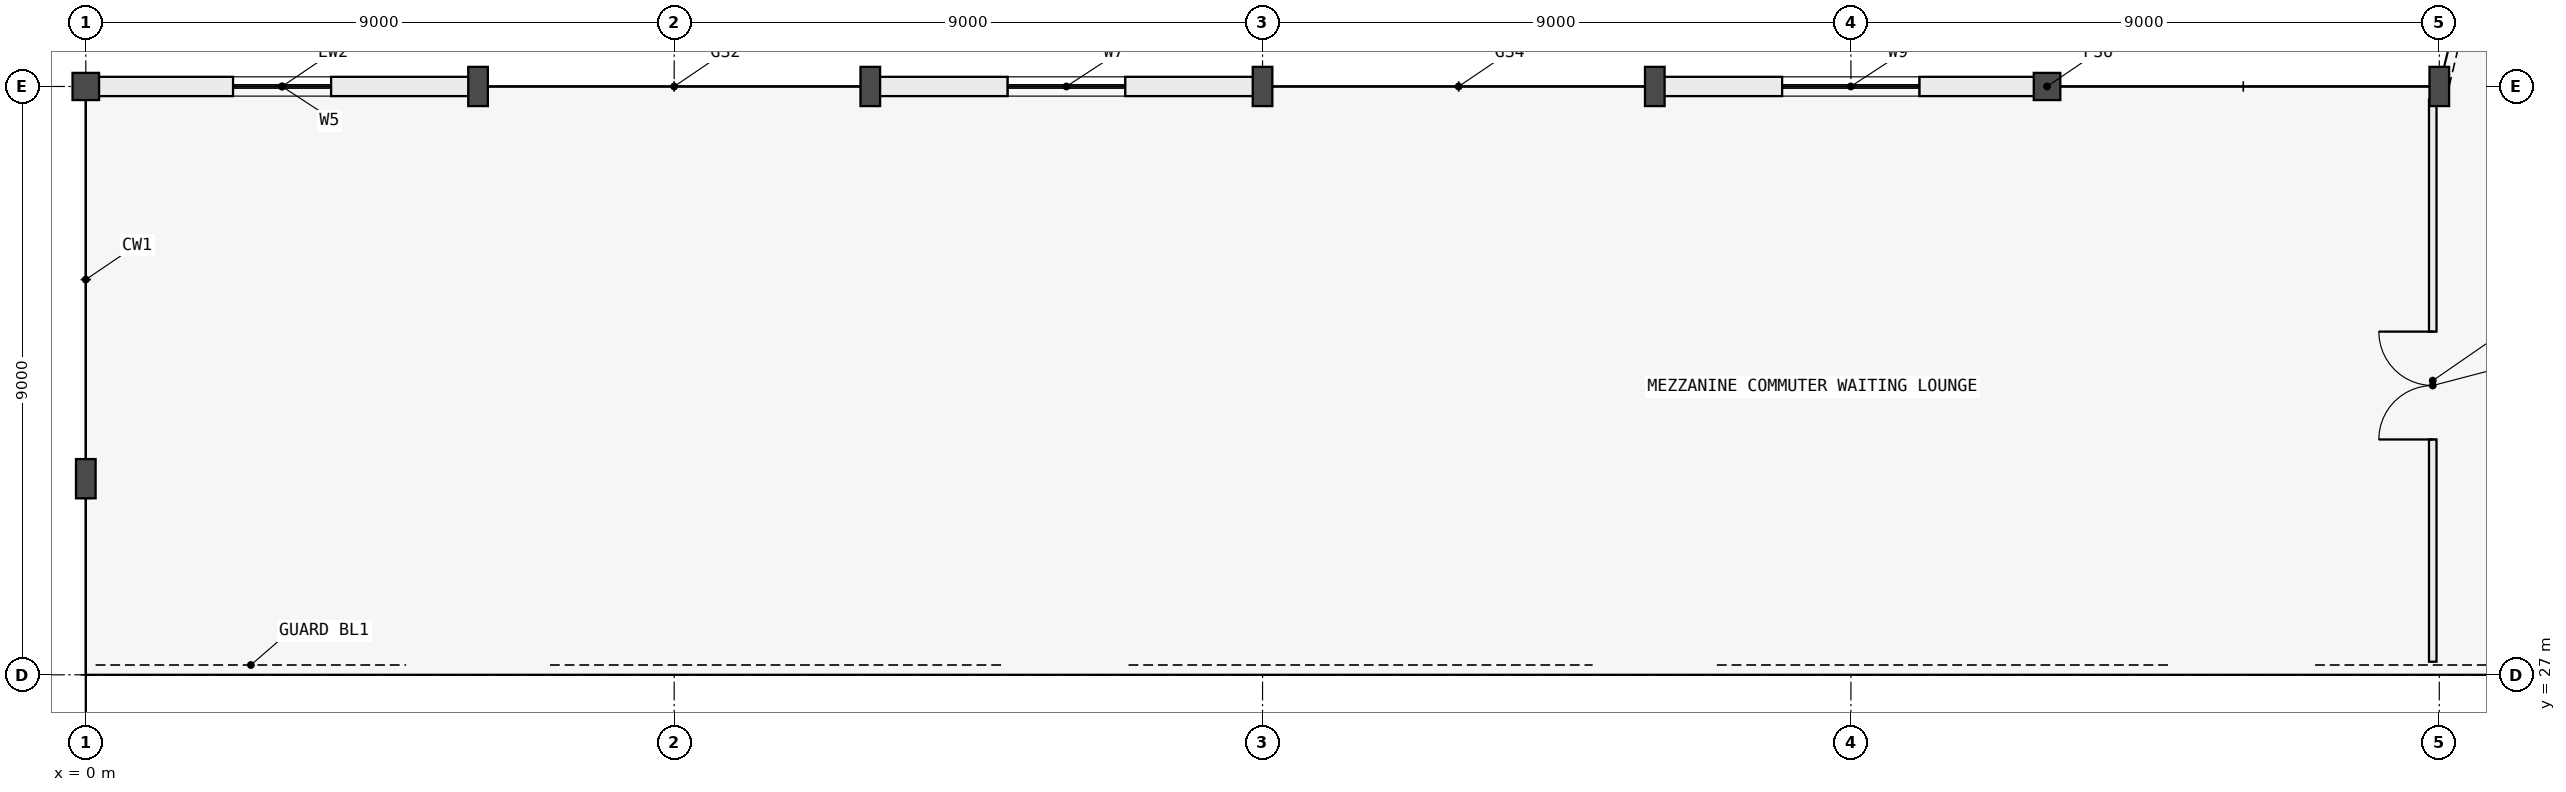
"""IFC4 building model, lengths in metres.
Left out: names, types, materials, properties, quantities, classifications, styles, units other than length and angle.
Written with IfcOpenShell. Run it as: python <this file> out.ifc"""

import sys

from ifc_helpers import new_model, si_unit, direction, frame, frame_2d, origin, origin_2d, place, context, subcontext, project, spatial, rectangle, i_section, extrude, element, fill, save


model = new_model("IFC4")
c1 = context("Model", 3, precision=1e-05, world=origin(), true_north=direction((0.0, 1.0)))
c2 = subcontext(c1, "Body", "Model", "MODEL_VIEW")
j1 = project(units=[si_unit("LENGTHUNIT", "METRE"), si_unit("PLANEANGLEUNIT", "RADIAN")], contexts=[c1])
p1 = place(None, origin())
s1 = spatial("IfcSite", under=j1, at=p1, CompositionType="ELEMENT")
p2 = place(p1, origin())
s2 = spatial("IfcBuilding", under=s1, at=p2, CompositionType="ELEMENT")
p3 = place(p2, frame((0.0, 0.0, 4.2)))
s3 = spatial("IfcBuildingStorey", under=s2, at=p3, CompositionType="ELEMENT", Elevation=4.2)
p4 = place(p3, frame((0.0, 36.0, 0.0), z_axis=(0.0, 0.0, 1.0), x_axis=(1.0, 0.0, 0.0)))
e1 = element("IfcColumn", 1, at=p4, inside=s3, PredefinedType="COLUMN", context=c2, shape_type="SweptSolid", body=[
    extrude(i_section(OverallWidth=0.406, OverallDepth=0.416, WebThickness=0.024, FlangeThickness=0.039, FilletRadius=0.015, at=origin_2d()), origin(), (0.0, 0.0, 1.0), 4.2),
])
p5 = place(p3, frame((30.0, 36.0, 0.0), z_axis=(0.0, 0.0, 1.0), x_axis=(1.0, 0.0, 0.0)))
e2 = element("IfcColumn", 2, at=p5, inside=s3, PredefinedType="COLUMN", context=c2, shape_type="SweptSolid", body=[
    extrude(i_section(OverallWidth=0.406, OverallDepth=0.416, WebThickness=0.024, FlangeThickness=0.039, FilletRadius=0.015, at=origin_2d()), origin(), (0.0, 0.0, 1.0), 4.242),
])
for number, where, z_axis, x_axis in (
    (3, (6.0, 36.0, 0.0), (0.0, 0.0, 1.0), (1.0, 0.0, 0.0)),
    (4, (12.0, 36.0, 0.0), (0.0, 0.0, 1.0), (1.0, 0.0, 0.0)),
    (5, (18.0, 36.0, 0.0), (0.0, 0.0, 1.0), (1.0, 0.0, 0.0)),
    (6, (24.0, 36.0, 0.0), (0.0, 0.0, 1.0), (1.0, 0.0, 0.0)),
    (7, (36.0, 36.0, 0.0), (0.0, 0.0, 1.0), (1.0, 0.0, 0.0)),
    (8, (0.0, 30.0, 0.0), (0.0, 0.0, 1.0), (1.0, 0.0, 0.0)),
):
    element("IfcColumn", number, at=place(p3, frame(where, z_axis=z_axis, x_axis=x_axis)), inside=s3, PredefinedType="COLUMN", context=c2, shape_type="SweptSolid", body=[
        extrude(i_section(OverallWidth=0.3, OverallDepth=0.6, WebThickness=0.015, FlangeThickness=0.03, FilletRadius=0.027, at=origin_2d()), origin(), (0.0, 0.0, 1.0), 4.2),
    ])
p6 = place(p3, frame((0.012, 36.0, 0.0), z_axis=(0.0, 0.0, 1.0), x_axis=(1.0, 0.0, 0.0)))
e9 = element("IfcWall", 9, at=p6, inside=s3, PredefinedType="STANDARD", context=c2, shape_type="SweptSolid", body=[
    extrude(rectangle(XDim=5.98, YDim=0.295, at=frame_2d((2.99, 0.0))), origin(), (0.0, 0.0, 1.0), 3.25),
])
p7 = place(p6, frame((2.24, 0.0, 0.95)))
e10 = element("IfcOpeningElement", 10, at=p7, cuts=e9, PredefinedType="OPENING", context=c2, shape_type="SweptSolid", body=[
    extrude(rectangle(XDim=1.5, YDim=1.5, at=frame_2d((0.75, 0.75))), frame((0.0, 0.157, 0.0), z_axis=(0.0, -1.0, 0.0), x_axis=(1.0, 0.0, 0.0)), (0.0, 0.0, 1.0), 0.315),
])
p8 = place(p3, frame((12.008, 36.0, 0.0), z_axis=(0.0, 0.0, 1.0), x_axis=(1.0, 0.0, 0.0)))
e11 = element("IfcWall", 11, at=p8, inside=s3, PredefinedType="STANDARD", context=c2, shape_type="SweptSolid", body=[
    extrude(rectangle(XDim=5.984, YDim=0.295, at=frame_2d((2.992, 0.0))), origin(), (0.0, 0.0, 1.0), 3.25),
])
p9 = place(p8, frame((2.092, 0.0, 0.95)))
e12 = element("IfcOpeningElement", 12, at=p9, cuts=e11, PredefinedType="OPENING", context=c2, shape_type="SweptSolid", body=[
    extrude(rectangle(XDim=1.8, YDim=1.6, at=frame_2d((0.9, 0.8))), frame((0.0, 0.157, 0.0), z_axis=(0.0, -1.0, 0.0), x_axis=(1.0, 0.0, 0.0)), (0.0, 0.0, 1.0), 0.315),
])
p10 = place(p3, frame((24.008, 36.0, 0.0), z_axis=(0.0, 0.0, 1.0), x_axis=(1.0, 0.0, 0.0)))
e13 = element("IfcWall", 13, at=p10, inside=s3, PredefinedType="STANDARD", context=c2, shape_type="SweptSolid", body=[
    extrude(rectangle(XDim=5.98, YDim=0.295, at=frame_2d((2.99, 0.0))), origin(), (0.0, 0.0, 1.0), 3.25),
])
p11 = place(p10, frame((1.94, 0.0, 0.95)))
e14 = element("IfcOpeningElement", 14, at=p11, cuts=e13, PredefinedType="OPENING", context=c2, shape_type="SweptSolid", body=[
    extrude(rectangle(XDim=2.1, YDim=1.7, at=frame_2d((1.05, 0.85))), frame((0.0, 0.157, 0.0), z_axis=(0.0, -1.0, 0.0), x_axis=(1.0, 0.0, 0.0)), (0.0, 0.0, 1.0), 0.315),
])
p12 = place(p3, frame((35.9, 27.2, 0.0), z_axis=(0.0, 0.0, 1.0), x_axis=(0.0, 1.0, 0.0)))
e15 = element("IfcWall", 15, at=p12, inside=s3, PredefinedType="MOVABLE", context=c2, shape_type="SweptSolid", body=[
    extrude(rectangle(XDim=8.6, YDim=0.115, at=frame_2d((4.3, 0.0))), origin(), (0.0, 0.0, 1.0), 3.945),
])
p13 = place(p12, frame((3.4, 0.0, 0.0)))
e16 = element("IfcOpeningElement", 16, at=p13, cuts=e15, PredefinedType="OPENING", context=c2, shape_type="SweptSolid", body=[
    extrude(rectangle(XDim=1.65, YDim=2.25, at=frame_2d((0.825, 1.125))), frame((0.0, 0.067, 0.0), z_axis=(0.0, -1.0, 0.0), x_axis=(1.0, 0.0, 0.0)), (0.0, 0.0, 1.0), 0.135),
])
p14 = place(p7, origin())
e17 = element("IfcWindow", 17, at=p14, inside=s3, PartitioningType="SINGLE_PANEL", PredefinedType="WINDOW", context=c2, shape_type="SweptSolid", body=[
    extrude(rectangle(XDim=1.5, YDim=1.5, at=frame_2d((0.75, 0.75))), frame((0.0, 0.03, 0.0), z_axis=(0.0, -1.0, 0.0), x_axis=(1.0, 0.0, 0.0)), (0.0, 0.0, 1.0), 0.06),
])
fill(e10, e17)
p15 = place(p9, origin())
e18 = element("IfcWindow", 18, at=p15, inside=s3, PartitioningType="SINGLE_PANEL", PredefinedType="WINDOW", context=c2, shape_type="SweptSolid", body=[
    extrude(rectangle(XDim=1.8, YDim=1.6, at=frame_2d((0.9, 0.8))), frame((0.0, 0.03, 0.0), z_axis=(0.0, -1.0, 0.0), x_axis=(1.0, 0.0, 0.0)), (0.0, 0.0, 1.0), 0.06),
])
fill(e12, e18)
p16 = place(p11, origin())
e19 = element("IfcWindow", 19, at=p16, inside=s3, PartitioningType="SINGLE_PANEL", PredefinedType="WINDOW", context=c2, shape_type="SweptSolid", body=[
    extrude(rectangle(XDim=2.1, YDim=1.7, at=frame_2d((1.05, 0.85))), frame((0.0, 0.03, 0.0), z_axis=(0.0, -1.0, 0.0), x_axis=(1.0, 0.0, 0.0)), (0.0, 0.0, 1.0), 0.06),
])
fill(e14, e19)
p17 = place(p13, origin())
e20 = element("IfcDoor", 20, at=p17, inside=s3, OperationType="DOUBLE_DOOR_SINGLE_SWING", PredefinedType="DOOR", context=c2, shape_type="SweptSolid", body=[
    extrude(rectangle(XDim=1.65, YDim=2.25, at=frame_2d((0.825, 1.125))), frame((0.0, 0.025, 0.0), z_axis=(0.0, -1.0, 0.0), x_axis=(1.0, 0.0, 0.0)), (0.0, 0.0, 1.0), 0.05),
])
fill(e16, e20)
save(model, sys.argv[1])
